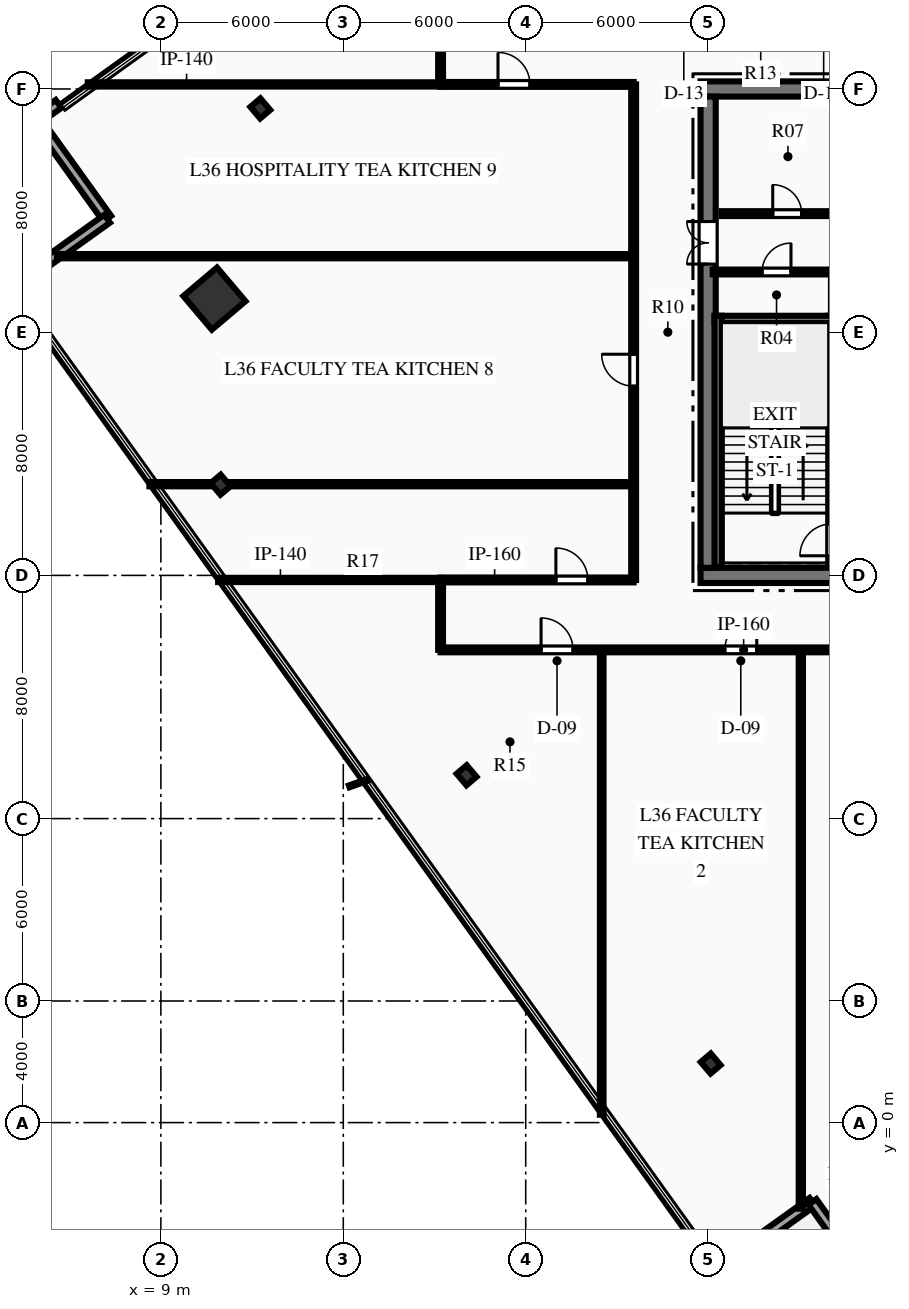
"""IFC4 building model, lengths in metres.
Left out: names, types, materials, properties, quantities, classifications, styles, units other than length and angle.
Written with IfcOpenShell. Run it as: python <this file> out.ifc"""

import sys

from ifc_helpers import new_model, si_unit, direction, frame, frame_2d, origin, origin_2d, place, context, subcontext, project, spatial, rectangle, hollow_rectangle, i_section, extrude, element, fill, save


model = new_model("IFC4")
c1 = context("Model", 3, precision=1e-05, world=origin(), true_north=direction((0.0, 1.0)))
c2 = subcontext(c1, "Body", "Model", "MODEL_VIEW")
j1 = project(units=[si_unit("LENGTHUNIT", "METRE"), si_unit("PLANEANGLEUNIT", "RADIAN")], contexts=[c1])
p1 = place(None, origin())
s1 = spatial("IfcSite", under=j1, at=p1, CompositionType="ELEMENT")
p2 = place(p1, origin())
s2 = spatial("IfcBuilding", under=s1, at=p2, CompositionType="ELEMENT")
p3 = place(p2, frame((0.0, 0.0, 148.2)))
s3 = spatial("IfcBuildingStorey", under=s2, at=p3, CompositionType="ELEMENT", Elevation=148.2)
p4 = place(p3, frame((26.75, 18.0, 0.0), z_axis=(0.0, 0.0, 1.0), x_axis=(1.0, 0.0, 0.0)))
e1 = element("IfcWall", 1, at=p4, inside=s3, PredefinedType="SHEAR", context=c2, shape_type="SweptSolid", body=[
    extrude(rectangle(XDim=18.5, YDim=0.5, at=frame_2d((9.25, 0.0))), origin(), (0.0, 0.0, 1.0), 3.75),
])
p5 = place(p4, frame((7.35, 0.0, 0.0)))
e2 = element("IfcOpeningElement", 2, at=p5, cuts=e1, PredefinedType="OPENING", context=c2, shape_type="SweptSolid", body=[
    extrude(rectangle(XDim=1.1, YDim=2.15, at=frame_2d((0.55, 1.075))), frame((0.0, 0.26, 0.0), z_axis=(0.0, -1.0, 0.0), x_axis=(1.0, 0.0, 0.0)), (0.0, 0.0, 1.0), 0.52),
])
p6 = place(p4, frame((10.05, 0.0, 0.0)))
e3 = element("IfcOpeningElement", 3, at=p6, cuts=e1, PredefinedType="OPENING", context=c2, shape_type="SweptSolid", body=[
    extrude(rectangle(XDim=1.1, YDim=2.15, at=frame_2d((0.55, 1.075))), frame((0.0, 0.26, 0.0), z_axis=(0.0, -1.0, 0.0), x_axis=(1.0, 0.0, 0.0)), (0.0, 0.0, 1.0), 0.52),
])
p7 = place(p3, frame((26.75, 34.0, 0.0), z_axis=(0.0, 0.0, 1.0), x_axis=(1.0, 0.0, 0.0)))
e4 = element("IfcWall", 4, at=p7, inside=s3, PredefinedType="SHEAR", context=c2, shape_type="SweptSolid", body=[
    extrude(rectangle(XDim=18.5, YDim=0.5, at=frame_2d((9.25, 0.0))), origin(), (0.0, 0.0, 1.0), 3.75),
])
p8 = place(p7, frame((13.935, 0.0, 0.0)))
e5 = element("IfcOpeningElement", 5, at=p8, cuts=e4, PredefinedType="OPENING", context=c2, shape_type="SweptSolid", body=[
    extrude(rectangle(XDim=1.1, YDim=2.15, at=frame_2d((0.55, 1.075))), frame((0.0, 0.26, 0.0), z_axis=(0.0, -1.0, 0.0), x_axis=(1.0, 0.0, 0.0)), (0.0, 0.0, 1.0), 0.52),
])
p9 = place(p7, frame((16.185, 0.0, 0.0)))
e6 = element("IfcOpeningElement", 6, at=p9, cuts=e4, PredefinedType="OPENING", context=c2, shape_type="SweptSolid", body=[
    extrude(rectangle(XDim=1.1, YDim=2.15, at=frame_2d((0.55, 1.075))), frame((0.0, 0.26, 0.0), z_axis=(0.0, -1.0, 0.0), x_axis=(1.0, 0.0, 0.0)), (0.0, 0.0, 1.0), 0.52),
])
p10 = place(p3, frame((27.0, 18.25, 0.0), z_axis=(0.0, 0.0, 1.0), x_axis=(0.0, 1.0, 0.0)))
e7 = element("IfcWall", 7, at=p10, inside=s3, PredefinedType="SHEAR", context=c2, shape_type="SweptSolid", body=[
    extrude(rectangle(XDim=15.5, YDim=0.5, at=frame_2d((7.75, 0.0))), origin(), (0.0, 0.0, 1.0), 3.75),
])
p11 = place(p10, frame((9.99, 0.0, 0.0)))
e8 = element("IfcOpeningElement", 8, at=p11, cuts=e7, PredefinedType="OPENING", context=c2, shape_type="SweptSolid", body=[
    extrude(rectangle(XDim=1.4, YDim=2.2, at=frame_2d((0.7, 1.1))), frame((0.0, 0.26, 0.0), z_axis=(0.0, -1.0, 0.0), x_axis=(1.0, 0.0, 0.0)), (0.0, 0.0, 1.0), 0.52),
])
p12 = place(p3, frame((31.07, 18.28, 0.0), z_axis=(0.0, 0.0, 1.0), x_axis=(0.0, 1.0, 0.0)))
e9 = element("IfcWall", 9, at=p12, inside=s3, PredefinedType="SHEAR", context=c2, shape_type="SweptSolid", body=[
    extrude(rectangle(XDim=8.26, YDim=0.24, at=frame_2d((4.13, 0.0))), origin(), (0.0, 0.0, 1.0), 3.75),
])
p13 = place(p12, frame((0.365, 0.0, 0.0)))
e10 = element("IfcOpeningElement", 10, at=p13, cuts=e9, PredefinedType="OPENING", context=c2, shape_type="SweptSolid", body=[
    extrude(rectangle(XDim=1.05, YDim=2.15, at=frame_2d((0.525, 1.075))), frame((0.0, 0.13, 0.0), z_axis=(0.0, -1.0, 0.0), x_axis=(1.0, 0.0, 0.0)), (0.0, 0.0, 1.0), 0.26),
])
p14 = place(p3, frame((27.21, 26.42, 0.0), z_axis=(0.0, 0.0, 1.0), x_axis=(1.0, 0.0, 0.0)))
e11 = element("IfcWall", 11, at=p14, inside=s3, PredefinedType="SHEAR", context=c2, shape_type="SweptSolid", body=[
    extrude(rectangle(XDim=3.98, YDim=0.24, at=frame_2d((1.99, 0.0))), origin(), (0.0, 0.0, 1.0), 3.75),
])
p15 = place(p3, frame((27.33, 18.28, 0.0), z_axis=(0.0, 0.0, 1.0), x_axis=(0.0, 1.0, 0.0)))
e12 = element("IfcWall", 12, at=p15, inside=s3, PredefinedType="SHEAR", context=c2, shape_type="SweptSolid", body=[
    extrude(rectangle(XDim=8.26, YDim=0.24, at=frame_2d((4.13, 0.0))), origin(), (0.0, 0.0, 1.0), 3.75),
])
p16 = place(p3, frame((10.761, 27.104, 0.0), z_axis=(0.0, 0.0, 1.0), x_axis=(0.763232469783, 0.646123979643, 0.0)))
e13 = element("IfcColumn", 13, at=p16, inside=s3, PredefinedType="COLUMN", context=c2, shape_type="SweptSolid", body=[
    extrude(hollow_rectangle(XDim=1.45, YDim=1.45, WallThickness=0.07, at=origin_2d()), origin(), (0.0, 0.0, 1.0), 3.75),
])
for number, where, z_axis, x_axis in (
    (14, (12.27, 33.36, 0.0), (0.0, 0.0, 1.0), (0.763, 0.646, 0.0)),
    (15, (10.963, 20.983, 0.0), (0.0, 0.0, 1.0), (0.763, 0.646, 0.0)),
    (16, (19.055, 11.426, 0.0), (0.0, 0.0, 1.0), (0.763, 0.646, 0.0)),
    (17, (27.083, 1.942, 0.0), (0.0, 0.0, 1.0), (0.763, 0.646, 0.0)),
):
    element("IfcColumn", number, at=place(p3, frame(where, z_axis=z_axis, x_axis=x_axis)), inside=s3, PredefinedType="COLUMN", context=c2, shape_type="SweptSolid", body=[
        extrude(i_section(OverallWidth=0.432, OverallDepth=0.498, WebThickness=0.056, FlangeThickness=0.089, at=origin_2d()), origin(), (0.0, 0.0, 1.0), 3.75),
    ])
p17 = place(p3, frame((4.902, 32.984, 0.0), z_axis=(0.0, 0.0, 1.0), x_axis=(0.812485176157, 0.582981850939, 0.0)))
e18 = element("IfcWall", 18, at=p17, inside=s3, PredefinedType="STANDARD", context=c2, shape_type="SweptSolid", body=[
    extrude(rectangle(XDim=0.9, YDim=0.32, at=frame_2d((0.45, 0.0))), origin(), (0.0, 0.0, 1.0), 3.46),
])
for number, where, z_axis, x_axis in (
    (19, (7.233, 29.733, 0.0), (0.0, 0.0, 1.0), (-0.583, 0.813, 0.0)),
    (20, (3.983, 27.402, 0.0), (0.0, 0.0, 1.0), (0.813, 0.583, 0.0)),
    (21, (30.43, -2.608, 0.0), (0.0, 0.0, 1.0), (-0.813, -0.583, 0.0)),
):
    element("IfcWall", number, at=place(p3, frame(where, z_axis=z_axis, x_axis=x_axis)), inside=s3, PredefinedType="STANDARD", context=c2, shape_type="SweptSolid", body=[
        extrude(rectangle(XDim=4.0, YDim=0.32, at=frame_2d((2.0, 0.0))), origin(), (0.0, 0.0, 1.0), 3.46),
    ])
p18 = place(p3, frame((32.761, -5.858, 0.0), z_axis=(0.0, 0.0, 1.0), x_axis=(-0.582813264105, 0.812606115645, 0.0)))
e22 = element("IfcWall", 22, at=p18, inside=s3, PredefinedType="STANDARD", context=c2, shape_type="SweptSolid", body=[
    extrude(rectangle(XDim=4.0, YDim=0.32, at=frame_2d((2.0, 0.0))), origin(), (0.0, 0.0, 1.0), 3.46),
])
p19 = place(p18, frame((1.425, 0.0, 0.0)))
e23 = element("IfcOpeningElement", 23, at=p19, cuts=e22, PredefinedType="OPENING", context=c2, shape_type="SweptSolid", body=[
    extrude(rectangle(XDim=1.15, YDim=2.2, at=frame_2d((0.575, 1.1))), frame((0.0, 0.17, 0.0), z_axis=(0.0, -1.0, 0.0), x_axis=(1.0, 0.0, 0.0)), (0.0, 0.0, 1.0), 0.34),
])
p20 = place(p3, frame((27.15, 27.98, 0.0), z_axis=(0.0, 0.0, 1.0), x_axis=(1.0, 0.0, 0.0)))
e24 = element("IfcWall", 24, at=p20, inside=s3, PredefinedType="PARTITIONING", context=c2, shape_type="SweptSolid", body=[
    extrude(rectangle(XDim=4.05, YDim=0.16, at=frame_2d((2.025, 0.0))), origin(), (0.0, 0.0, 1.0), 3.46),
])
p21 = place(p20, frame((1.625, 0.0, 0.0)))
e25 = element("IfcOpeningElement", 25, at=p21, cuts=e24, PredefinedType="OPENING", context=c2, shape_type="SweptSolid", body=[
    extrude(rectangle(XDim=0.95, YDim=2.15, at=frame_2d((0.475, 1.075))), frame((0.0, 0.09, 0.0), z_axis=(0.0, -1.0, 0.0), x_axis=(1.0, 0.0, 0.0)), (0.0, 0.0, 1.0), 0.18),
])
p22 = place(p3, frame((27.45, 29.9, 0.0), z_axis=(0.0, 0.0, 1.0), x_axis=(1.0, 0.0, 0.0)))
e26 = element("IfcWall", 26, at=p22, inside=s3, PredefinedType="PARTITIONING", context=c2, shape_type="SweptSolid", body=[
    extrude(rectangle(XDim=4.43, YDim=0.16, at=frame_2d((2.215, 0.0))), origin(), (0.0, 0.0, 1.0), 3.46),
])
p23 = place(p22, frame((1.675, 0.0, 0.0)))
e27 = element("IfcOpeningElement", 27, at=p23, cuts=e26, PredefinedType="OPENING", context=c2, shape_type="SweptSolid", body=[
    extrude(rectangle(XDim=0.95, YDim=2.15, at=frame_2d((0.475, 1.075))), frame((0.0, 0.09, 0.0), z_axis=(0.0, -1.0, 0.0), x_axis=(1.0, 0.0, 0.0)), (0.0, 0.0, 1.0), 0.18),
])
p24 = place(p3, frame((18.2, 15.55, 0.0), z_axis=(0.0, 0.0, 1.0), x_axis=(1.0, 0.0, 0.0)))
e28 = element("IfcWall", 28, at=p24, inside=s3, PredefinedType="PARTITIONING", context=c2, shape_type="SweptSolid", body=[
    extrude(rectangle(XDim=35.6, YDim=0.16, at=frame_2d((17.8, 0.0))), origin(), (0.0, 0.0, 1.0), 3.46),
])
p25 = place(p24, frame((3.305, 0.0, 0.0)))
e29 = element("IfcOpeningElement", 29, at=p25, cuts=e28, PredefinedType="OPENING", context=c2, shape_type="SweptSolid", body=[
    extrude(rectangle(XDim=1.05, YDim=2.15, at=frame_2d((0.525, 1.075))), frame((0.0, 0.09, 0.0), z_axis=(0.0, -1.0, 0.0), x_axis=(1.0, 0.0, 0.0)), (0.0, 0.0, 1.0), 0.18),
])
p26 = place(p24, frame((9.349, 0.0, 0.0)))
e30 = element("IfcOpeningElement", 30, at=p26, cuts=e28, PredefinedType="OPENING", context=c2, shape_type="SweptSolid", body=[
    extrude(rectangle(XDim=1.05, YDim=2.15, at=frame_2d((0.525, 1.075))), frame((0.0, 0.09, 0.0), z_axis=(0.0, -1.0, 0.0), x_axis=(1.0, 0.0, 0.0)), (0.0, 0.0, 1.0), 0.18),
])
p27 = place(p24, frame((15.989, 0.0, 0.0)))
e31 = element("IfcOpeningElement", 31, at=p27, cuts=e28, PredefinedType="OPENING", context=c2, shape_type="SweptSolid", body=[
    extrude(rectangle(XDim=1.05, YDim=2.15, at=frame_2d((0.525, 1.075))), frame((0.0, 0.09, 0.0), z_axis=(0.0, -1.0, 0.0), x_axis=(1.0, 0.0, 0.0)), (0.0, 0.0, 1.0), 0.18),
])
p28 = place(p24, frame((28.865, 0.0, 0.0)))
e32 = element("IfcOpeningElement", 32, at=p28, cuts=e28, PredefinedType="OPENING", context=c2, shape_type="SweptSolid", body=[
    extrude(rectangle(XDim=1.05, YDim=2.15, at=frame_2d((0.525, 1.075))), frame((0.0, 0.09, 0.0), z_axis=(0.0, -1.0, 0.0), x_axis=(1.0, 0.0, 0.0)), (0.0, 0.0, 1.0), 0.18),
])
p29 = place(p3, frame((18.2, 17.85, 0.0), z_axis=(0.0, 0.0, 1.0), x_axis=(1.0, 0.0, 0.0)))
e33 = element("IfcWall", 33, at=p29, inside=s3, PredefinedType="PARTITIONING", context=c2, shape_type="SweptSolid", body=[
    extrude(rectangle(XDim=6.35, YDim=0.16, at=frame_2d((3.175, 0.0))), origin(), (0.0, 0.0, 1.0), 3.46),
])
p30 = place(p29, frame((3.793, 0.0, 0.0)))
e34 = element("IfcOpeningElement", 34, at=p30, cuts=e33, PredefinedType="OPENING", context=c2, shape_type="SweptSolid", body=[
    extrude(rectangle(XDim=1.05, YDim=2.15, at=frame_2d((0.525, 1.075))), frame((0.0, 0.09, 0.0), z_axis=(0.0, -1.0, 0.0), x_axis=(1.0, 0.0, 0.0)), (0.0, 0.0, 1.0), 0.18),
])
p31 = place(p3, frame((18.2, 34.15, 0.0), z_axis=(0.0, 0.0, 1.0), x_axis=(1.0, 0.0, 0.0)))
e35 = element("IfcWall", 35, at=p31, inside=s3, PredefinedType="PARTITIONING", context=c2, shape_type="SweptSolid", body=[
    extrude(rectangle(XDim=6.35, YDim=0.16, at=frame_2d((3.175, 0.0))), origin(), (0.0, 0.0, 1.0), 3.46),
])
p32 = place(p31, frame((1.888, 0.0, 0.0)))
e36 = element("IfcOpeningElement", 36, at=p32, cuts=e35, PredefinedType="OPENING", context=c2, shape_type="SweptSolid", body=[
    extrude(rectangle(XDim=1.05, YDim=2.15, at=frame_2d((0.525, 1.075))), frame((0.0, 0.09, 0.0), z_axis=(0.0, -1.0, 0.0), x_axis=(1.0, 0.0, 0.0)), (0.0, 0.0, 1.0), 0.18),
])
p33 = place(p3, frame((24.55, 17.85, 0.0), z_axis=(0.0, 0.0, 1.0), x_axis=(0.0, 1.0, 0.0)))
e37 = element("IfcWall", 37, at=p33, inside=s3, PredefinedType="PARTITIONING", context=c2, shape_type="SweptSolid", body=[
    extrude(rectangle(XDim=16.3, YDim=0.16, at=frame_2d((8.15, 0.0))), origin(), (0.0, 0.0, 1.0), 3.46),
])
p34 = place(p33, frame((6.375, 0.0, 0.0)))
e38 = element("IfcOpeningElement", 38, at=p34, cuts=e37, PredefinedType="OPENING", context=c2, shape_type="SweptSolid", body=[
    extrude(rectangle(XDim=1.05, YDim=2.15, at=frame_2d((0.525, 1.075))), frame((0.0, 0.09, 0.0), z_axis=(0.0, -1.0, 0.0), x_axis=(1.0, 0.0, 0.0)), (0.0, 0.0, 1.0), 0.18),
])
for number, where, z_axis, x_axis in (
    (39, (18.2, 15.55, 0.0), (0.0, 0.0, 1.0), (0.0, 1.0, 0.0)),
    (40, (18.2, 34.15, 0.0), (0.0, 0.0, 1.0), (0.0, 1.0, 0.0)),
):
    element("IfcWall", number, at=place(p3, frame(where, z_axis=z_axis, x_axis=x_axis)), inside=s3, PredefinedType="PARTITIONING", context=c2, shape_type="SweptSolid", body=[
        extrude(rectangle(XDim=2.3, YDim=0.16, at=frame_2d((1.15, 0.0))), origin(), (0.0, 0.0, 1.0), 3.46),
    ])
p35 = place(p3, frame((10.883, 17.85, 0.0), z_axis=(0.0, 0.0, 1.0), x_axis=(1.0, 0.0, 0.0)))
e41 = element("IfcWall", 41, at=p35, inside=s3, PredefinedType="PARTITIONING", context=c2, shape_type="SweptSolid", body=[
    extrude(rectangle(XDim=7.317, YDim=0.14, at=frame_2d((3.658, 0.0))), origin(), (0.0, 0.0, 1.0), 3.46),
])
p36 = place(p3, frame((6.596, 34.15, 0.0), z_axis=(0.0, 0.0, 1.0), x_axis=(1.0, 0.0, 0.0)))
e42 = element("IfcWall", 42, at=p36, inside=s3, PredefinedType="PARTITIONING", context=c2, shape_type="SweptSolid", body=[
    extrude(rectangle(XDim=11.604, YDim=0.14, at=frame_2d((5.802, 0.0))), origin(), (0.0, 0.0, 1.0), 3.46),
])
p37 = place(p3, frame((23.5, 0.259, 0.0), z_axis=(0.0, 0.0, 1.0), x_axis=(0.0, 1.0, 0.0)))
e43 = element("IfcWall", 43, at=p37, inside=s3, PredefinedType="PARTITIONING", context=c2, shape_type="SweptSolid", body=[
    extrude(rectangle(XDim=15.291, YDim=0.12, at=frame_2d((7.646, 0.0))), origin(), (0.0, 0.0, 1.0), 3.46),
])
p38 = place(p3, frame((30.05, -2.831, 0.0), z_axis=(0.0, 0.0, 1.0), x_axis=(0.0, 1.0, 0.0)))
e44 = element("IfcWall", 44, at=p38, inside=s3, PredefinedType="PARTITIONING", context=c2, shape_type="SweptSolid", body=[
    extrude(rectangle(XDim=18.381, YDim=0.14, at=frame_2d((9.19, 0.0))), origin(), (0.0, 0.0, 1.0), 3.46),
])
p39 = place(p3, frame((8.624, 21.0, 0.0), z_axis=(0.0, 0.0, 1.0), x_axis=(1.0, 0.0, 0.0)))
e45 = element("IfcWall", 45, at=p39, inside=s3, PredefinedType="PARTITIONING", context=c2, shape_type="SweptSolid", body=[
    extrude(rectangle(XDim=15.926, YDim=0.14, at=frame_2d((7.963, 0.0))), origin(), (0.0, 0.0, 1.0), 2.839),
])
p40 = place(p3, frame((5.582, 28.5, 0.0), z_axis=(0.0, 0.0, 1.0), x_axis=(1.0, 0.0, 0.0)))
e46 = element("IfcWall", 46, at=p40, inside=s3, PredefinedType="PARTITIONING", context=c2, shape_type="SweptSolid", body=[
    extrude(rectangle(XDim=18.968, YDim=0.14, at=frame_2d((9.484, 0.0))), origin(), (0.0, 0.0, 1.0), 3.46),
])
p41 = place(p21, origin())
e47 = element("IfcDoor", 47, at=p41, inside=s3, OperationType="SINGLE_SWING_RIGHT", PredefinedType="DOOR", context=c2, shape_type="SweptSolid", body=[
    extrude(rectangle(XDim=0.95, YDim=2.15, at=frame_2d((0.475, 1.075))), frame((0.0, 0.025, 0.0), z_axis=(0.0, -1.0, 0.0), x_axis=(1.0, 0.0, 0.0)), (0.0, 0.0, 1.0), 0.05),
])
fill(e25, e47)
p42 = place(p23, origin())
e48 = element("IfcDoor", 48, at=p42, inside=s3, OperationType="SINGLE_SWING_LEFT", PredefinedType="DOOR", context=c2, shape_type="SweptSolid", body=[
    extrude(rectangle(XDim=0.95, YDim=2.15, at=frame_2d((0.475, 1.075))), frame((0.0, 0.025, 0.0), z_axis=(0.0, -1.0, 0.0), x_axis=(1.0, 0.0, 0.0)), (0.0, 0.0, 1.0), 0.05),
])
fill(e27, e48)
p43 = place(p11, origin())
e49 = element("IfcDoor", 49, at=p43, inside=s3, OperationType="DOUBLE_DOOR_SINGLE_SWING", PredefinedType="DOOR", context=c2, shape_type="SweptSolid", body=[
    extrude(rectangle(XDim=1.4, YDim=2.2, at=frame_2d((0.7, 1.1))), frame((0.0, 0.025, 0.0), z_axis=(0.0, -1.0, 0.0), x_axis=(1.0, 0.0, 0.0)), (0.0, 0.0, 1.0), 0.05),
])
fill(e8, e49)
p44 = place(p25, origin())
e50 = element("IfcDoor", 50, at=p44, inside=s3, OperationType="SINGLE_SWING_LEFT", PredefinedType="DOOR", context=c2, shape_type="SweptSolid", body=[
    extrude(rectangle(XDim=1.05, YDim=2.15, at=frame_2d((0.525, 1.075))), frame((0.0, 0.025, 0.0), z_axis=(0.0, -1.0, 0.0), x_axis=(1.0, 0.0, 0.0)), (0.0, 0.0, 1.0), 0.05),
])
fill(e29, e50)
p45 = place(p26, origin())
e51 = element("IfcDoor", 51, at=p45, inside=s3, OperationType="SINGLE_SWING_RIGHT", PredefinedType="DOOR", context=c2, shape_type="SweptSolid", body=[
    extrude(rectangle(XDim=1.05, YDim=2.15, at=frame_2d((0.525, 1.075))), frame((0.0, 0.025, 0.0), z_axis=(0.0, -1.0, 0.0), x_axis=(1.0, 0.0, 0.0)), (0.0, 0.0, 1.0), 0.05),
])
fill(e30, e51)
p46 = place(p30, origin())
e52 = element("IfcDoor", 52, at=p46, inside=s3, OperationType="SINGLE_SWING_LEFT", PredefinedType="DOOR", context=c2, shape_type="SweptSolid", body=[
    extrude(rectangle(XDim=1.05, YDim=2.15, at=frame_2d((0.525, 1.075))), frame((0.0, 0.025, 0.0), z_axis=(0.0, -1.0, 0.0), x_axis=(1.0, 0.0, 0.0)), (0.0, 0.0, 1.0), 0.05),
])
fill(e34, e52)
p47 = place(p34, origin())
e53 = element("IfcDoor", 53, at=p47, inside=s3, OperationType="SINGLE_SWING_RIGHT", PredefinedType="DOOR", context=c2, shape_type="SweptSolid", body=[
    extrude(rectangle(XDim=1.05, YDim=2.15, at=frame_2d((0.525, 1.075))), frame((0.0, 0.025, 0.0), z_axis=(0.0, -1.0, 0.0), x_axis=(1.0, 0.0, 0.0)), (0.0, 0.0, 1.0), 0.05),
])
fill(e38, e53)
p48 = place(p32, origin())
e54 = element("IfcDoor", 54, at=p48, inside=s3, OperationType="SINGLE_SWING_LEFT", PredefinedType="DOOR", context=c2, shape_type="SweptSolid", body=[
    extrude(rectangle(XDim=1.05, YDim=2.15, at=frame_2d((0.525, 1.075))), frame((0.0, 0.025, 0.0), z_axis=(0.0, -1.0, 0.0), x_axis=(1.0, 0.0, 0.0)), (0.0, 0.0, 1.0), 0.05),
])
fill(e36, e54)
save(model, sys.argv[1])
